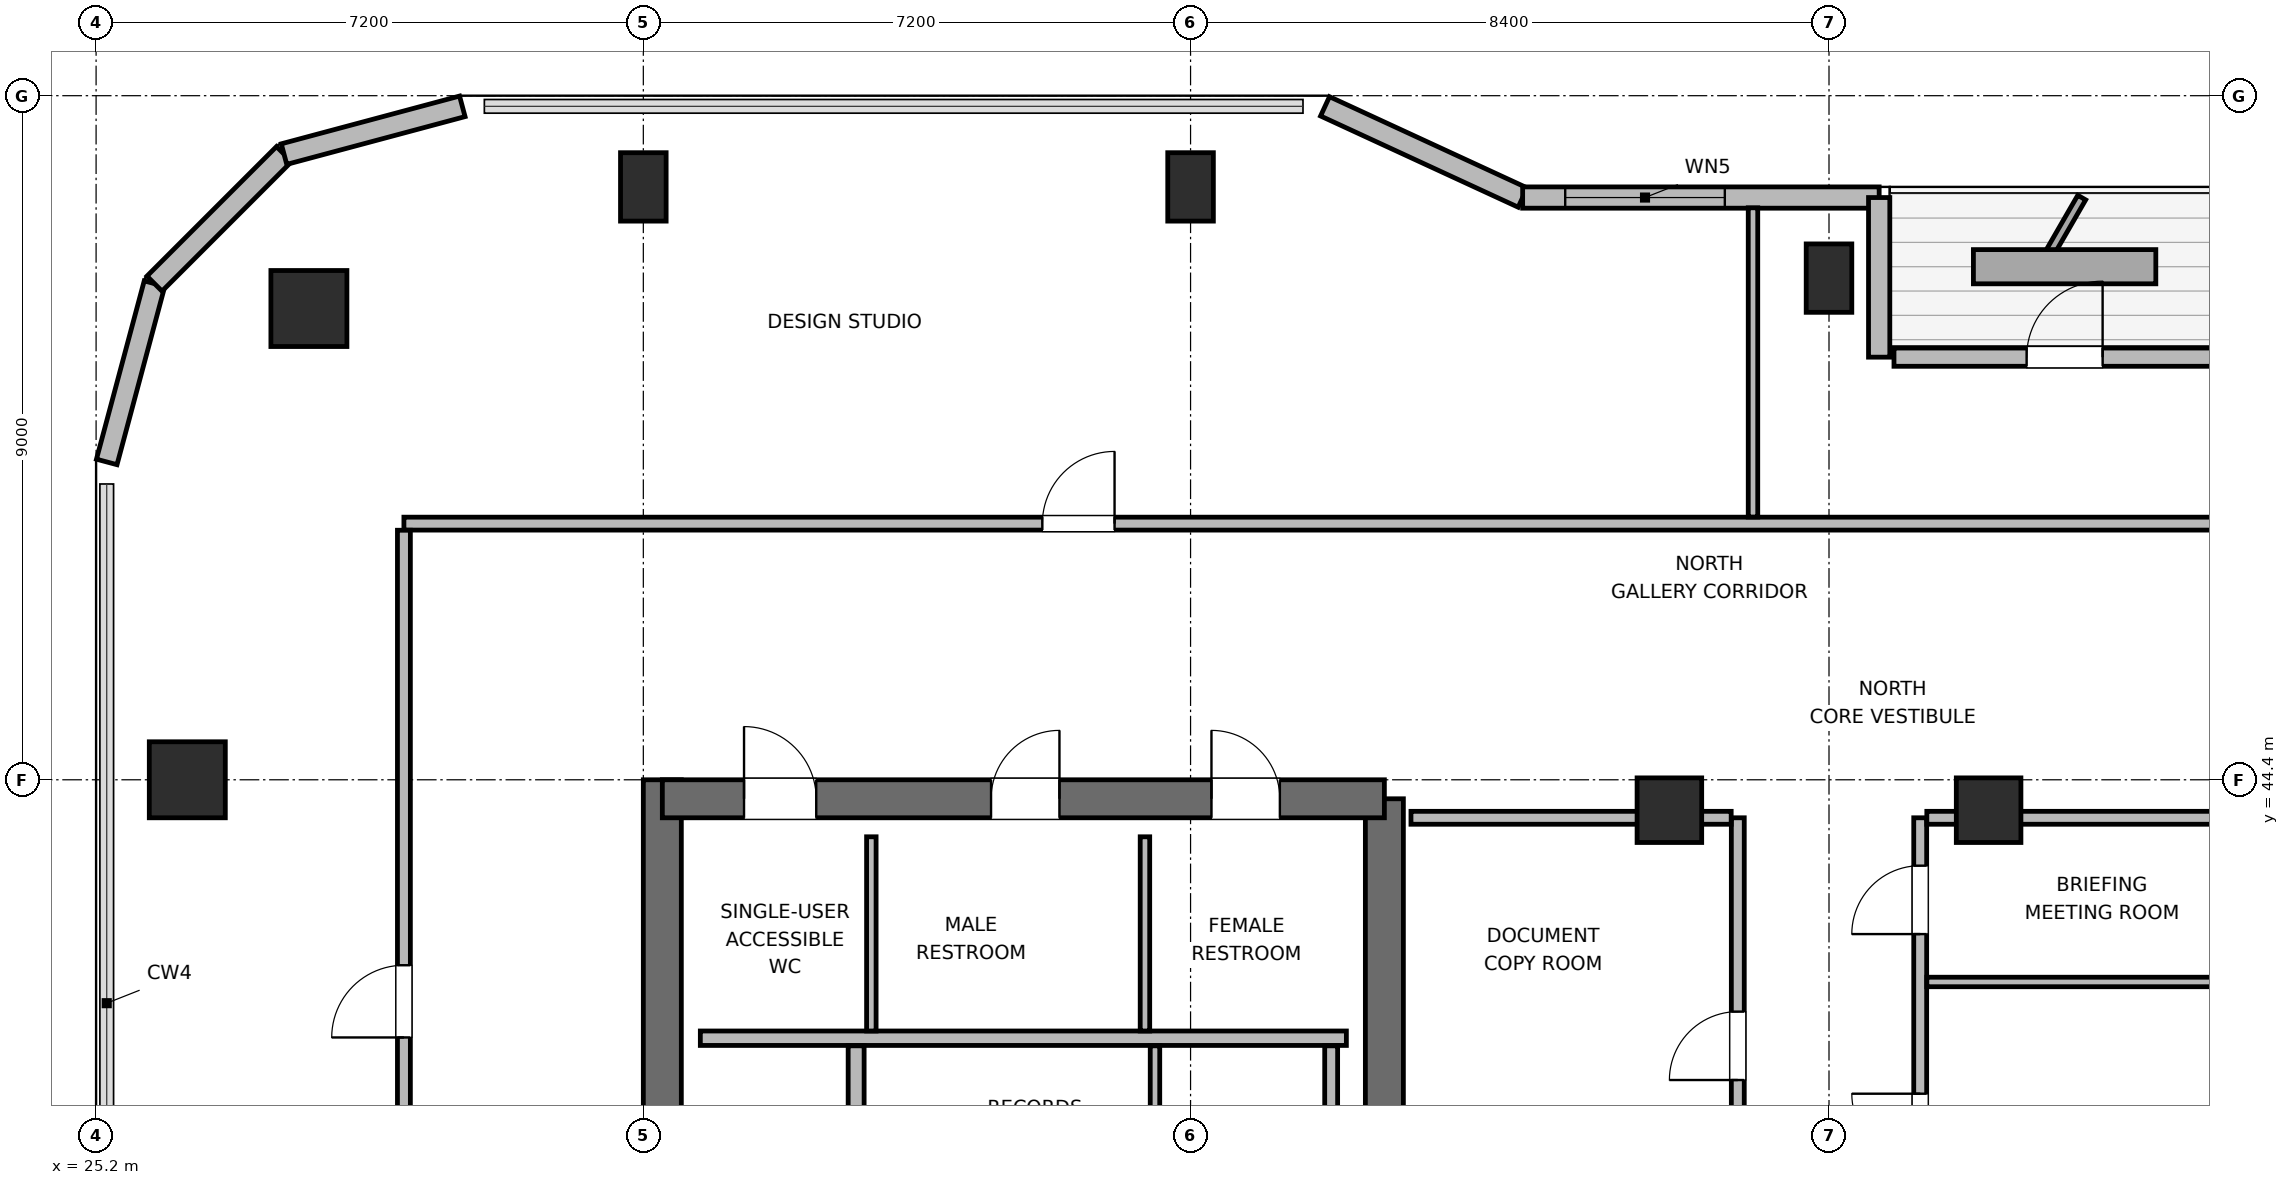
"""IFC4 building model, lengths in metres.
Left out: names, types, materials, properties, quantities, classifications, styles, units other than length and angle.
Written with IfcOpenShell. Run it as: python <this file> out.ifc"""

import sys

from ifc_helpers import new_model, si_unit, direction, frame, frame_2d, origin, origin_2d, place, context, subcontext, project, spatial, rectangle, circle, extrude, element, fill, save


model = new_model("IFC4")
c1 = context("Model", 3, precision=1e-05, world=origin(), true_north=direction((0.0, 1.0)))
c2 = subcontext(c1, "Body", "Model", "MODEL_VIEW")
j1 = project(units=[si_unit("LENGTHUNIT", "METRE"), si_unit("PLANEANGLEUNIT", "RADIAN")], contexts=[c1])
p1 = place(None, origin())
s1 = spatial("IfcSite", under=j1, at=p1, CompositionType="ELEMENT")
p2 = place(p1, origin())
s2 = spatial("IfcBuilding", under=s1, at=p2, CompositionType="ELEMENT")
p3 = place(p2, frame((0.0, 0.0, 286.2)))
s3 = spatial("IfcBuildingStorey", under=s2, at=p3, CompositionType="ELEMENT", Elevation=286.2)
p4 = place(p3, frame((32.65, 27.6, 0.0), z_axis=(0.0, 0.0, 1.0), x_axis=(0.0, 1.0, 0.0)))
e1 = element("IfcWall", 1, at=p4, inside=s3, PredefinedType="SHEAR", context=c2, shape_type="SweptSolid", body=[
    extrude(rectangle(XDim=16.8, YDim=0.5, at=frame_2d((8.4, 0.0))), origin(), (0.0, 0.0, 1.0), 3.9),
])
p5 = place(p3, frame((42.15, 37.8, 0.0), z_axis=(0.0, 0.0, 1.0), x_axis=(0.0, 1.0, 0.0)))
e2 = element("IfcWall", 2, at=p5, inside=s3, PredefinedType="SHEAR", context=c2, shape_type="SweptSolid", body=[
    extrude(rectangle(XDim=6.35, YDim=0.5, at=frame_2d((3.175, 0.0))), origin(), (0.0, 0.0, 1.0), 3.9),
])
p6 = place(p3, frame((32.65, 44.15, 0.0), z_axis=(0.0, 0.0, 1.0), x_axis=(1.0, 0.0, 0.0)))
e3 = element("IfcWall", 3, at=p6, inside=s3, PredefinedType="SHEAR", context=c2, shape_type="SweptSolid", body=[
    extrude(rectangle(XDim=9.5, YDim=0.5, at=frame_2d((4.75, 0.0))), origin(), (0.0, 0.0, 1.0), 3.9),
])
p7 = place(p6, frame((1.075, 0.0, 0.0)))
e4 = element("IfcOpeningElement", 4, at=p7, cuts=e3, PredefinedType="OPENING", context=c2, shape_type="SweptSolid", body=[
    extrude(rectangle(XDim=0.95, YDim=2.04, at=frame_2d((0.475, 1.02))), frame((0.0, 0.26, 0.0), z_axis=(0.0, -1.0, 0.0), x_axis=(1.0, 0.0, 0.0)), (0.0, 0.0, 1.0), 0.52),
])
p8 = place(p6, frame((4.325, 0.0, 0.0)))
e5 = element("IfcOpeningElement", 5, at=p8, cuts=e3, PredefinedType="OPENING", context=c2, shape_type="SweptSolid", body=[
    extrude(rectangle(XDim=0.9, YDim=2.02, at=frame_2d((0.45, 1.01))), frame((0.0, 0.26, 0.0), z_axis=(0.0, -1.0, 0.0), x_axis=(1.0, 0.0, 0.0)), (0.0, 0.0, 1.0), 0.52),
])
p9 = place(p6, frame((7.225, 0.0, 0.0)))
e6 = element("IfcOpeningElement", 6, at=p9, cuts=e3, PredefinedType="OPENING", context=c2, shape_type="SweptSolid", body=[
    extrude(rectangle(XDim=0.9, YDim=2.02, at=frame_2d((0.45, 1.01))), frame((0.0, 0.26, 0.0), z_axis=(0.0, -1.0, 0.0), x_axis=(1.0, 0.0, 0.0)), (0.0, 0.0, 1.0), 0.52),
])
p10 = place(p3, frame((28.0, 50.6, 0.0), z_axis=(0.0, 0.0, 1.0), x_axis=(1.0, 0.0, 0.0)))
e7 = element("IfcColumn", 7, at=p10, inside=s3, PredefinedType="COLUMN", context=c2, shape_type="SweptSolid", body=[
    extrude(circle(Radius=0.5, at=origin_2d()), origin(), (0.0, 0.0, 1.0), 3.9),
])
for number, where, z_axis, x_axis in (
    (8, (32.4, 52.2, 0.0), (0.0, 0.0, 1.0), (1.0, 0.0, 0.0)),
    (9, (39.6, 52.2, 0.0), (0.0, 0.0, 1.0), (1.0, 0.0, 0.0)),
    (10, (48.0, 51.0, 0.0), (0.0, 0.0, 1.0), (1.0, 0.0, 0.0)),
):
    element("IfcColumn", number, at=place(p3, frame(where, z_axis=z_axis, x_axis=x_axis)), inside=s3, PredefinedType="COLUMN", context=c2, shape_type="SweptSolid", body=[
        extrude(rectangle(XDim=0.6, YDim=0.9, at=origin_2d()), origin(), (0.0, 0.0, 1.0), 3.9),
    ])
p11 = place(p3, frame((26.4, 44.4, 0.0), z_axis=(0.0, 0.0, 1.0), x_axis=(1.0, 0.0, 0.0)))
e11 = element("IfcColumn", 11, at=p11, inside=s3, PredefinedType="COLUMN", context=c2, shape_type="SweptSolid", body=[
    extrude(rectangle(XDim=1.0, YDim=1.0, at=origin_2d()), origin(), (0.0, 0.0, 1.0), 3.9),
])
for number, where, z_axis, x_axis in (
    (12, (45.9, 44.0, 0.0), (0.0, 0.0, 1.0), (1.0, 0.0, 0.0)),
    (13, (50.1, 44.0, 0.0), (0.0, 0.0, 1.0), (1.0, 0.0, 0.0)),
):
    element("IfcColumn", number, at=place(p3, frame(where, z_axis=z_axis, x_axis=x_axis)), inside=s3, PredefinedType="COLUMN", context=c2, shape_type="SweptSolid", body=[
        extrude(rectangle(XDim=0.85, YDim=0.85, at=origin_2d()), origin(), (0.0, 0.0, 1.0), 3.9),
    ])
p12 = place(p3, frame((25.34, 48.582, 0.0), z_axis=(0.0, 0.0, 1.0), x_axis=(0.258751159445, 0.965944013639, 0.0)))
e14 = element("IfcWall", 14, at=p12, inside=s3, PredefinedType="SOLIDWALL", context=c2, shape_type="SweptSolid", body=[
    extrude(rectangle(XDim=2.429, YDim=0.28, at=frame_2d((1.214, 0.0))), origin(), (0.0, 0.0, 1.0), 3.68),
])
p13 = place(p3, frame((25.969, 50.927, 0.0), z_axis=(0.0, 0.0, 1.0), x_axis=(0.707106781187, 0.707106781187, 0.0)))
e15 = element("IfcWall", 15, at=p13, inside=s3, PredefinedType="SOLIDWALL", context=c2, shape_type="SweptSolid", body=[
    extrude(rectangle(XDim=2.41, YDim=0.28, at=frame_2d((1.205, 0.0))), origin(), (0.0, 0.0, 1.0), 3.68),
])
p14 = place(p3, frame((27.673, 52.632, 0.0), z_axis=(0.0, 0.0, 1.0), x_axis=(0.965937282298, 0.25877628691, 0.0)))
e16 = element("IfcWall", 16, at=p14, inside=s3, PredefinedType="SOLIDWALL", context=c2, shape_type="SweptSolid", body=[
    extrude(rectangle(XDim=2.428, YDim=0.28, at=frame_2d((1.214, 0.0))), origin(), (0.0, 0.0, 1.0), 3.68),
])
p15 = place(p3, frame((41.369, 53.26, 0.0), z_axis=(0.0, 0.0, 1.0), x_axis=(0.907956889006, -0.419063584324, 0.0)))
e17 = element("IfcWall", 17, at=p15, inside=s3, PredefinedType="SOLIDWALL", context=c2, shape_type="SweptSolid", body=[
    extrude(rectangle(XDim=2.864, YDim=0.28, at=frame_2d((1.432, 0.0))), origin(), (0.0, 0.0, 1.0), 2.265),
])
p16 = place(p3, frame((43.969, 52.06, 0.0), z_axis=(0.0, 0.0, 1.0), x_axis=(1.0, 0.0, 0.0)))
e18 = element("IfcWall", 18, at=p16, inside=s3, PredefinedType="SOLIDWALL", context=c2, shape_type="SweptSolid", body=[
    extrude(rectangle(XDim=4.691, YDim=0.28, at=frame_2d((2.345, 0.0))), origin(), (0.0, 0.0, 1.0), 2.265),
])
p17 = place(p16, frame((0.56, 0.0, 0.85)))
e19 = element("IfcOpeningElement", 19, at=p17, cuts=e18, PredefinedType="OPENING", context=c2, shape_type="SweptSolid", body=[
    extrude(rectangle(XDim=2.1, YDim=1.05, at=frame_2d((1.05, 0.525))), frame((0.0, 0.15, 0.0), z_axis=(0.0, -1.0, 0.0), x_axis=(1.0, 0.0, 0.0)), (0.0, 0.0, 1.0), 0.3),
])
p18 = place(p3, frame((48.66, 52.06, 0.0), z_axis=(0.0, 0.0, 1.0), x_axis=(0.0, -1.0, 0.0)))
e20 = element("IfcWall", 20, at=p18, inside=s3, PredefinedType="SOLIDWALL", context=c2, shape_type="SweptSolid", body=[
    extrude(rectangle(XDim=2.1, YDim=0.28, at=frame_2d((1.05, 0.0))), origin(), (0.0, 0.0, 1.0), 2.265),
])
p19 = place(p3, frame((48.855, 49.96, 0.0), z_axis=(0.0, 0.0, 1.0), x_axis=(1.0, 0.0, 0.0)))
e21 = element("IfcWall", 21, at=p19, inside=s3, PredefinedType="SOLIDWALL", context=c2, shape_type="SweptSolid", body=[
    extrude(rectangle(XDim=4.49, YDim=0.24, at=frame_2d((2.245, 0.0))), origin(), (0.0, 0.0, 1.0), 3.68),
])
p20 = place(p19, frame((1.745, 0.0, 0.0)))
e22 = element("IfcOpeningElement", 22, at=p20, cuts=e21, PredefinedType="OPENING", context=c2, shape_type="SweptSolid", body=[
    extrude(rectangle(XDim=1.0, YDim=2.02, at=frame_2d((0.5, 1.01))), frame((0.0, 0.13, 0.0), z_axis=(0.0, -1.0, 0.0), x_axis=(1.0, 0.0, 0.0)), (0.0, 0.0, 1.0), 0.26),
])
p21 = place(p3, frame((33.15, 41.0, 0.0), z_axis=(0.0, 0.0, 1.0), x_axis=(1.0, 0.0, 0.0)))
e23 = element("IfcWall", 23, at=p21, inside=s3, PredefinedType="PLUMBINGWALL", context=c2, shape_type="SweptSolid", body=[
    extrude(rectangle(XDim=8.5, YDim=0.19, at=frame_2d((4.25, 0.0))), origin(), (0.0, 0.0, 1.0), 3.68),
])
for number, where, z_axis, x_axis in (
    (24, (35.4, 41.095, 0.0), (0.0, 0.0, 1.0), (0.0, 1.0, 0.0)),
    (25, (39.0, 41.095, 0.0), (0.0, 0.0, 1.0), (0.0, 1.0, 0.0)),
):
    element("IfcWall", number, at=place(p3, frame(where, z_axis=z_axis, x_axis=x_axis)), inside=s3, PredefinedType="PARTITIONING", context=c2, shape_type="SweptSolid", body=[
        extrude(rectangle(XDim=2.555, YDim=0.125, at=frame_2d((1.277, 0.0))), origin(), (0.0, 0.0, 1.0), 3.68),
    ])
p22 = place(p3, frame((35.2, 39.58, 0.0), z_axis=(0.0, 0.0, 1.0), x_axis=(0.0, 1.0, 0.0)))
e26 = element("IfcWall", 26, at=p22, inside=s3, PredefinedType="PARTITIONING", context=c2, shape_type="SweptSolid", body=[
    extrude(rectangle(XDim=1.32, YDim=0.21, at=frame_2d((0.66, 0.0))), origin(), (0.0, 0.0, 1.0), 3.68),
])
p23 = place(p3, frame((41.45, 38.087, 0.0), z_axis=(0.0, 0.0, 1.0), x_axis=(0.0, 1.0, 0.0)))
e27 = element("IfcWall", 27, at=p23, inside=s3, PredefinedType="PARTITIONING", context=c2, shape_type="SweptSolid", body=[
    extrude(rectangle(XDim=2.813, YDim=0.17, at=frame_2d((1.406, 0.0))), origin(), (0.0, 0.0, 1.0), 3.68),
])
p24 = place(p3, frame((39.132, 38.087, 0.0), z_axis=(0.0, 0.0, 1.0), x_axis=(0.0, 1.0, 0.0)))
e28 = element("IfcWall", 28, at=p24, inside=s3, PredefinedType="PARTITIONING", context=c2, shape_type="SweptSolid", body=[
    extrude(rectangle(XDim=2.813, YDim=0.125, at=frame_2d((1.406, 0.0))), origin(), (0.0, 0.0, 1.0), 3.68),
])
p25 = place(p3, frame((46.8, 37.9, 0.0), z_axis=(0.0, 0.0, 1.0), x_axis=(0.0, 1.0, 0.0)))
e29 = element("IfcWall", 29, at=p25, inside=s3, PredefinedType="PARTITIONING", context=c2, shape_type="SweptSolid", body=[
    extrude(rectangle(XDim=6.0, YDim=0.17, at=frame_2d((3.0, 0.0))), origin(), (0.0, 0.0, 1.0), 3.68),
])
p26 = place(p25, frame((2.55, 0.0, 0.0)))
e30 = element("IfcOpeningElement", 30, at=p26, cuts=e29, PredefinedType="OPENING", context=c2, shape_type="SweptSolid", body=[
    extrude(rectangle(XDim=0.9, YDim=2.02, at=frame_2d((0.45, 1.01))), frame((0.0, 0.095, 0.0), z_axis=(0.0, -1.0, 0.0), x_axis=(1.0, 0.0, 0.0)), (0.0, 0.0, 1.0), 0.19),
])
p27 = place(p3, frame((42.5, 43.9, 0.0), z_axis=(0.0, 0.0, 1.0), x_axis=(1.0, 0.0, 0.0)))
e31 = element("IfcWall", 31, at=p27, inside=s3, PredefinedType="PARTITIONING", context=c2, shape_type="SweptSolid", body=[
    extrude(rectangle(XDim=4.213, YDim=0.17, at=frame_2d((2.106, 0.0))), origin(), (0.0, 0.0, 1.0), 2.765),
])
p28 = place(p3, frame((49.2, 37.9, 0.0), z_axis=(0.0, 0.0, 1.0), x_axis=(0.0, 1.0, 0.0)))
e32 = element("IfcWall", 32, at=p28, inside=s3, PredefinedType="PARTITIONING", context=c2, shape_type="SweptSolid", body=[
    extrude(rectangle(XDim=6.0, YDim=0.17, at=frame_2d((3.0, 0.0))), origin(), (0.0, 0.0, 1.0), 3.68),
])
p29 = place(p28, frame((1.47, 0.0, 0.0)))
e33 = element("IfcOpeningElement", 33, at=p29, cuts=e32, PredefinedType="OPENING", context=c2, shape_type="SweptSolid", body=[
    extrude(rectangle(XDim=0.9, YDim=2.02, at=frame_2d((0.45, 1.01))), frame((0.0, 0.095, 0.0), z_axis=(0.0, -1.0, 0.0), x_axis=(1.0, 0.0, 0.0)), (0.0, 0.0, 1.0), 0.19),
])
p30 = place(p28, frame((4.47, 0.0, 0.0)))
e34 = element("IfcOpeningElement", 34, at=p30, cuts=e32, PredefinedType="OPENING", context=c2, shape_type="SweptSolid", body=[
    extrude(rectangle(XDim=0.9, YDim=2.02, at=frame_2d((0.45, 1.01))), frame((0.0, 0.095, 0.0), z_axis=(0.0, -1.0, 0.0), x_axis=(1.0, 0.0, 0.0)), (0.0, 0.0, 1.0), 0.19),
])
p31 = place(p3, frame((49.287, 43.9, 0.0), z_axis=(0.0, 0.0, 1.0), x_axis=(1.0, 0.0, 0.0)))
e35 = element("IfcWall", 35, at=p31, inside=s3, PredefinedType="PARTITIONING", context=c2, shape_type="SweptSolid", body=[
    extrude(rectangle(XDim=4.113, YDim=0.17, at=frame_2d((2.056, 0.0))), origin(), (0.0, 0.0, 1.0), 2.765),
])
p32 = place(p3, frame((49.287, 41.74, 0.0), z_axis=(0.0, 0.0, 1.0), x_axis=(1.0, 0.0, 0.0)))
e36 = element("IfcWall", 36, at=p32, inside=s3, PredefinedType="PARTITIONING", context=c2, shape_type="SweptSolid", body=[
    extrude(rectangle(XDim=4.113, YDim=0.125, at=frame_2d((2.056, 0.0))), origin(), (0.0, 0.0, 1.0), 3.68),
])
p33 = place(p3, frame((29.25, 47.77, 0.0), z_axis=(0.0, 0.0, 1.0), x_axis=(1.0, 0.0, 0.0)))
e37 = element("IfcWall", 37, at=p33, inside=s3, PredefinedType="PARTITIONING", context=c2, shape_type="SweptSolid", body=[
    extrude(rectangle(XDim=34.35, YDim=0.17, at=frame_2d((17.175, 0.0))), origin(), (0.0, 0.0, 1.0), 3.68),
])
p34 = place(p33, frame((8.4, 0.0, 0.0)))
e38 = element("IfcOpeningElement", 38, at=p34, cuts=e37, PredefinedType="OPENING", context=c2, shape_type="SweptSolid", body=[
    extrude(rectangle(XDim=0.95, YDim=2.04, at=frame_2d((0.475, 1.02))), frame((0.0, 0.095, 0.0), z_axis=(0.0, -1.0, 0.0), x_axis=(1.0, 0.0, 0.0)), (0.0, 0.0, 1.0), 0.19),
])
p35 = place(p33, frame((25.575, 0.0, 0.0)))
e39 = element("IfcOpeningElement", 39, at=p35, cuts=e37, PredefinedType="OPENING", context=c2, shape_type="SweptSolid", body=[
    extrude(rectangle(XDim=0.95, YDim=2.04, at=frame_2d((0.475, 1.02))), frame((0.0, 0.095, 0.0), z_axis=(0.0, -1.0, 0.0), x_axis=(1.0, 0.0, 0.0)), (0.0, 0.0, 1.0), 0.19),
])
p36 = place(p3, frame((29.25, 24.317, 0.0), z_axis=(0.0, 0.0, 1.0), x_axis=(0.0, 1.0, 0.0)))
e40 = element("IfcWall", 40, at=p36, inside=s3, PredefinedType="PARTITIONING", context=c2, shape_type="SweptSolid", body=[
    extrude(rectangle(XDim=23.366, YDim=0.17, at=frame_2d((11.683, 0.0))), origin(), (0.0, 0.0, 1.0), 3.68),
])
p37 = place(p36, frame((4.923, 0.0, 0.0)))
e41 = element("IfcOpeningElement", 41, at=p37, cuts=e40, PredefinedType="OPENING", context=c2, shape_type="SweptSolid", body=[
    extrude(rectangle(XDim=0.95, YDim=2.04, at=frame_2d((0.475, 1.02))), frame((0.0, 0.095, 0.0), z_axis=(0.0, -1.0, 0.0), x_axis=(1.0, 0.0, 0.0)), (0.0, 0.0, 1.0), 0.19),
])
p38 = place(p36, frame((16.693, 0.0, 0.0)))
e42 = element("IfcOpeningElement", 42, at=p38, cuts=e40, PredefinedType="OPENING", context=c2, shape_type="SweptSolid", body=[
    extrude(rectangle(XDim=0.95, YDim=2.04, at=frame_2d((0.475, 1.02))), frame((0.0, 0.095, 0.0), z_axis=(0.0, -1.0, 0.0), x_axis=(1.0, 0.0, 0.0)), (0.0, 0.0, 1.0), 0.19),
])
p39 = place(p3, frame((47.0, 47.857, 0.0), z_axis=(0.0, 0.0, 1.0), x_axis=(0.0, 1.0, 0.0)))
e43 = element("IfcWall", 43, at=p39, inside=s3, PredefinedType="PARTITIONING", context=c2, shape_type="SweptSolid", body=[
    extrude(rectangle(XDim=4.068, YDim=0.125, at=frame_2d((2.034, 0.0))), origin(), (0.0, 0.0, 1.0), 3.68),
])
p40 = place(p17, origin())
e44 = element("IfcWindow", 44, at=p40, inside=s3, PartitioningType="SINGLE_PANEL", PredefinedType="WINDOW", context=c2, shape_type="SweptSolid", body=[
    extrude(rectangle(XDim=2.1, YDim=1.05, at=frame_2d((1.05, 0.525))), frame((0.0, 0.03, 0.0), z_axis=(0.0, -1.0, 0.0), x_axis=(1.0, 0.0, 0.0)), (0.0, 0.0, 1.0), 0.06),
])
fill(e19, e44)
p41 = place(p20, origin())
e45 = element("IfcDoor", 45, at=p41, inside=s3, OperationType="SINGLE_SWING_RIGHT", PredefinedType="DOOR", context=c2, shape_type="SweptSolid", body=[
    extrude(rectangle(XDim=1.0, YDim=2.02, at=frame_2d((0.5, 1.01))), frame((0.0, 0.025, 0.0), z_axis=(0.0, -1.0, 0.0), x_axis=(1.0, 0.0, 0.0)), (0.0, 0.0, 1.0), 0.05),
])
fill(e22, e45)
p42 = place(p7, origin())
e46 = element("IfcDoor", 46, at=p42, inside=s3, OperationType="SINGLE_SWING_LEFT", PredefinedType="DOOR", context=c2, shape_type="SweptSolid", body=[
    extrude(rectangle(XDim=0.95, YDim=2.04, at=frame_2d((0.475, 1.02))), frame((0.0, 0.025, 0.0), z_axis=(0.0, -1.0, 0.0), x_axis=(1.0, 0.0, 0.0)), (0.0, 0.0, 1.0), 0.05),
])
fill(e4, e46)
p43 = place(p8, origin())
e47 = element("IfcDoor", 47, at=p43, inside=s3, OperationType="SINGLE_SWING_RIGHT", PredefinedType="DOOR", context=c2, shape_type="SweptSolid", body=[
    extrude(rectangle(XDim=0.9, YDim=2.02, at=frame_2d((0.45, 1.01))), frame((0.0, 0.025, 0.0), z_axis=(0.0, -1.0, 0.0), x_axis=(1.0, 0.0, 0.0)), (0.0, 0.0, 1.0), 0.05),
])
fill(e5, e47)
p44 = place(p9, origin())
e48 = element("IfcDoor", 48, at=p44, inside=s3, OperationType="SINGLE_SWING_LEFT", PredefinedType="DOOR", context=c2, shape_type="SweptSolid", body=[
    extrude(rectangle(XDim=0.9, YDim=2.02, at=frame_2d((0.45, 1.01))), frame((0.0, 0.025, 0.0), z_axis=(0.0, -1.0, 0.0), x_axis=(1.0, 0.0, 0.0)), (0.0, 0.0, 1.0), 0.05),
])
fill(e6, e48)
p45 = place(p26, origin())
e49 = element("IfcDoor", 49, at=p45, inside=s3, OperationType="SINGLE_SWING_LEFT", PredefinedType="DOOR", context=c2, shape_type="SweptSolid", body=[
    extrude(rectangle(XDim=0.9, YDim=2.02, at=frame_2d((0.45, 1.01))), frame((0.0, 0.025, 0.0), z_axis=(0.0, -1.0, 0.0), x_axis=(1.0, 0.0, 0.0)), (0.0, 0.0, 1.0), 0.05),
])
fill(e30, e49)
p46 = place(p29, origin())
e50 = element("IfcDoor", 50, at=p46, inside=s3, OperationType="SINGLE_SWING_RIGHT", PredefinedType="DOOR", context=c2, shape_type="SweptSolid", body=[
    extrude(rectangle(XDim=0.9, YDim=2.02, at=frame_2d((0.45, 1.01))), frame((0.0, 0.025, 0.0), z_axis=(0.0, -1.0, 0.0), x_axis=(1.0, 0.0, 0.0)), (0.0, 0.0, 1.0), 0.05),
])
fill(e33, e50)
p47 = place(p30, origin())
e51 = element("IfcDoor", 51, at=p47, inside=s3, OperationType="SINGLE_SWING_LEFT", PredefinedType="DOOR", context=c2, shape_type="SweptSolid", body=[
    extrude(rectangle(XDim=0.9, YDim=2.02, at=frame_2d((0.45, 1.01))), frame((0.0, 0.025, 0.0), z_axis=(0.0, -1.0, 0.0), x_axis=(1.0, 0.0, 0.0)), (0.0, 0.0, 1.0), 0.05),
])
fill(e34, e51)
p48 = place(p34, origin())
e52 = element("IfcDoor", 52, at=p48, inside=s3, OperationType="SINGLE_SWING_RIGHT", PredefinedType="DOOR", context=c2, shape_type="SweptSolid", body=[
    extrude(rectangle(XDim=0.95, YDim=2.04, at=frame_2d((0.475, 1.02))), frame((0.0, 0.025, 0.0), z_axis=(0.0, -1.0, 0.0), x_axis=(1.0, 0.0, 0.0)), (0.0, 0.0, 1.0), 0.05),
])
fill(e38, e52)
p49 = place(p38, origin())
e53 = element("IfcDoor", 53, at=p49, inside=s3, OperationType="SINGLE_SWING_LEFT", PredefinedType="DOOR", context=c2, shape_type="SweptSolid", body=[
    extrude(rectangle(XDim=0.95, YDim=2.04, at=frame_2d((0.475, 1.02))), frame((0.0, 0.025, 0.0), z_axis=(0.0, -1.0, 0.0), x_axis=(1.0, 0.0, 0.0)), (0.0, 0.0, 1.0), 0.05),
])
fill(e42, e53)
save(model, sys.argv[1])
